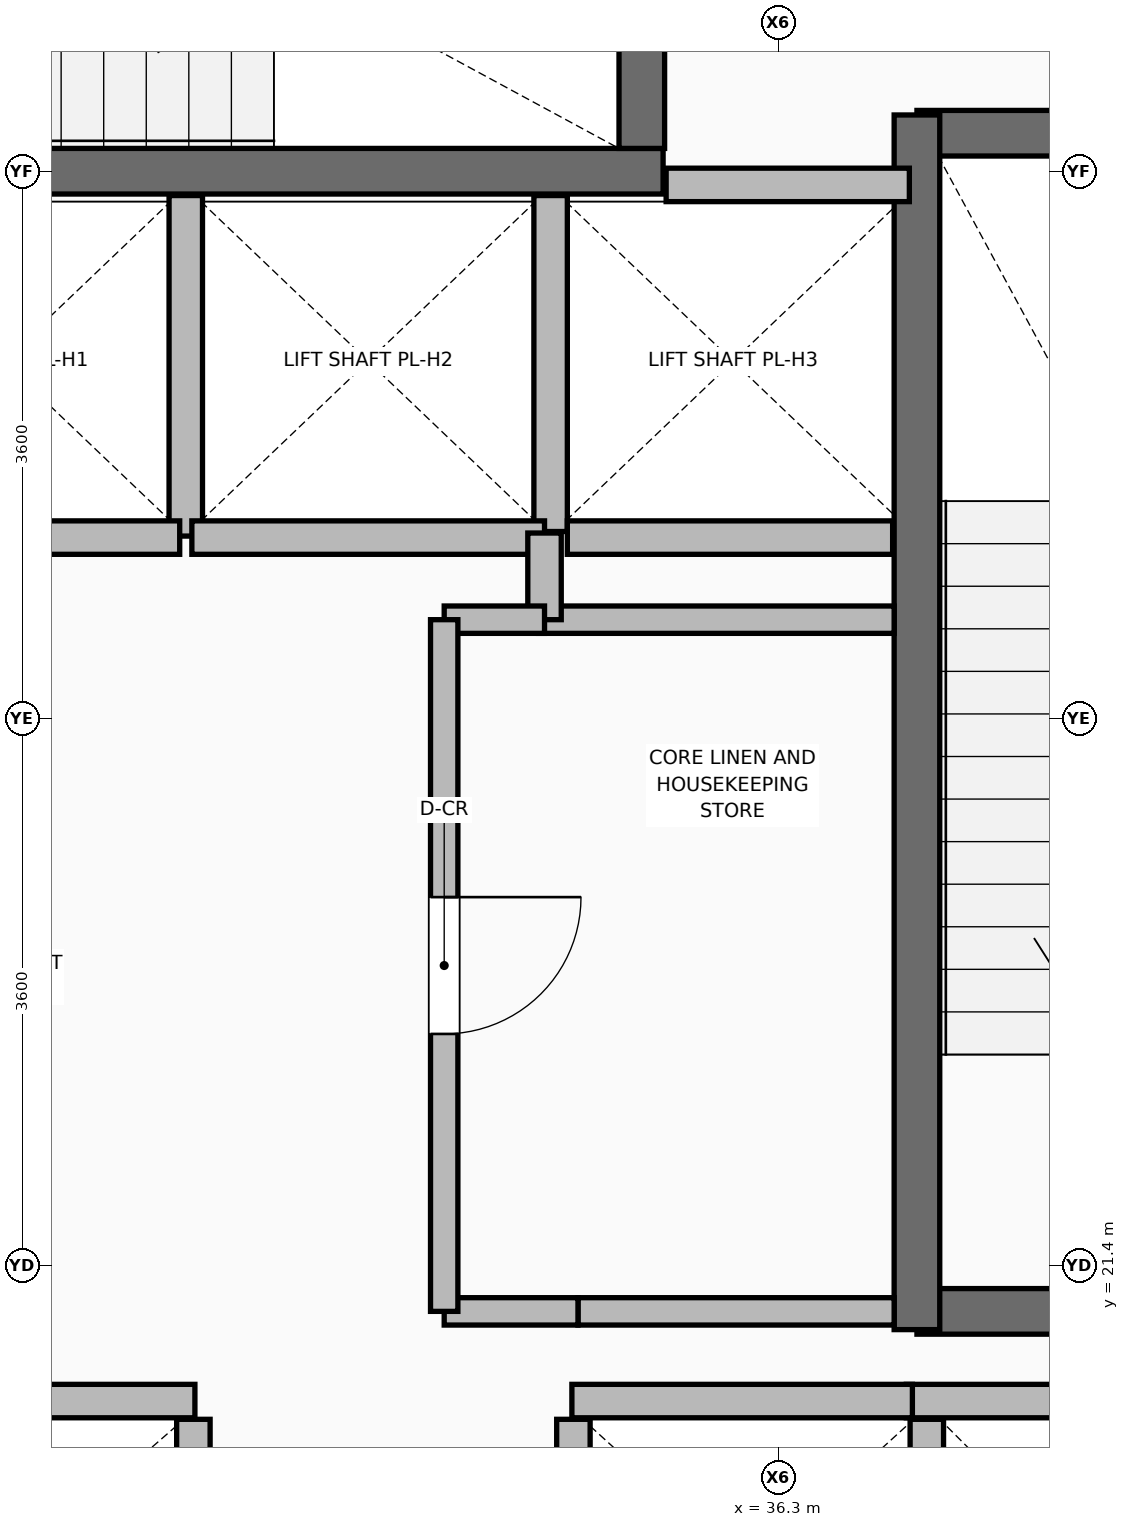
"""IFC4 building model, lengths in metres.
Left out: names, types, materials, properties, quantities, classifications, styles, units other than length and angle.
Written with IfcOpenShell. Run it as: python <this file> out.ifc"""

import sys

from ifc_helpers import new_model, si_unit, direction, frame, frame_2d, origin, place, context, subcontext, project, spatial, rectangle, extrude, element, fill, save


model = new_model("IFC4")
c1 = context("Model", 3, precision=1e-05, world=origin(), true_north=direction((0.0, 1.0)))
c2 = subcontext(c1, "Body", "Model", "MODEL_VIEW")
j1 = project(units=[si_unit("LENGTHUNIT", "METRE"), si_unit("PLANEANGLEUNIT", "RADIAN")], contexts=[c1])
p1 = place(None, origin())
s1 = spatial("IfcSite", under=j1, at=p1, CompositionType="ELEMENT")
p2 = place(p1, origin())
s2 = spatial("IfcBuilding", under=s1, at=p2, CompositionType="ELEMENT")
p3 = place(p2, frame((0.0, 0.0, 11.0)))
s3 = spatial("IfcBuildingStorey", under=s2, at=p3, CompositionType="ELEMENT", Elevation=11.0)
for number, where, z_axis, x_axis in (
    (1, (32.45, 17.92, 0.0), (0.0, 0.0, 1.0), (0.0, 1.0, 0.0)),
    (2, (34.95, 17.92, 0.0), (0.0, 0.0, 1.0), (0.0, 1.0, 0.0)),
):
    element("IfcWall", number, at=place(p3, frame(where, z_axis=z_axis, x_axis=x_axis)), inside=s3, PredefinedType="PARTITIONING", context=c2, shape_type="SweptSolid", body=[
        extrude(rectangle(XDim=2.47, YDim=0.22, at=frame_2d((1.235, 0.0))), origin(), (0.0, 0.0, 1.0), 4.178),
    ])
p4 = place(p3, frame((37.275, 18.08, 0.0), z_axis=(0.0, 0.0, 1.0), x_axis=(0.0, 1.0, 0.0)))
e3 = element("IfcWall", 3, at=p4, inside=s3, PredefinedType="PARTITIONING", context=c2, shape_type="SweptSolid", body=[
    extrude(rectangle(XDim=2.31, YDim=0.22, at=frame_2d((1.155, 0.0))), origin(), (0.0, 0.0, 1.0), 4.795),
])
p5 = place(p3, frame((32.4, 26.2, 0.0), z_axis=(0.0, 0.0, 1.0), x_axis=(0.0, 1.0, 0.0)))
e4 = element("IfcWall", 4, at=p5, inside=s3, PredefinedType="PARTITIONING", context=c2, shape_type="SweptSolid", body=[
    extrude(rectangle(XDim=2.24, YDim=0.22, at=frame_2d((1.12, 0.0))), origin(), (0.0, 0.0, 1.0), 4.795),
])
p6 = place(p3, frame((34.8, 26.23, 0.0), z_axis=(0.0, 0.0, 1.0), x_axis=(0.0, 1.0, 0.0)))
e5 = element("IfcWall", 5, at=p6, inside=s3, PredefinedType="PARTITIONING", context=c2, shape_type="SweptSolid", body=[
    extrude(rectangle(XDim=2.21, YDim=0.22, at=frame_2d((1.105, 0.0))), origin(), (0.0, 0.0, 1.0), 4.795),
])
p7 = place(p3, frame((34.91, 26.19, 0.0), z_axis=(0.0, 0.0, 1.0), x_axis=(1.0, 0.0, 0.0)))
e6 = element("IfcWall", 6, at=p7, inside=s3, PredefinedType="PARTITIONING", context=c2, shape_type="SweptSolid", body=[
    extrude(rectangle(XDim=2.14, YDim=0.22, at=frame_2d((1.07, 0.0))), origin(), (0.0, 0.0, 1.0), 4.795),
])
for number, where, z_axis, x_axis in (
    (7, (37.21, 21.1, 0.0), (0.0, 0.0, 1.0), (1.0, 0.0, 0.0)),
    (8, (37.21, 28.85, 0.0), (0.0, 0.0, 1.0), (1.0, 0.0, 0.0)),
):
    element("IfcWall", number, at=place(p3, frame(where, z_axis=z_axis, x_axis=x_axis)), inside=s3, PredefinedType="SHEAR", context=c2, shape_type="SweptSolid", body=[
        extrude(rectangle(XDim=3.565, YDim=0.3, at=frame_2d((1.782, 0.0))), origin(), (0.0, 0.0, 1.0), 4.82),
    ])
p8 = place(p3, frame((37.21, 20.98, 0.0), z_axis=(0.0, 0.0, 1.0), x_axis=(0.0, 1.0, 0.0)))
e9 = element("IfcWall", 9, at=p8, inside=s3, PredefinedType="SHEAR", context=c2, shape_type="SweptSolid", body=[
    extrude(rectangle(XDim=7.99, YDim=0.3, at=frame_2d((3.995, 0.0))), origin(), (0.0, 0.0, 1.0), 4.82),
])
p9 = place(p3, frame((27.51, 28.6, 0.0), z_axis=(0.0, 0.0, 1.0), x_axis=(1.0, 0.0, 0.0)))
e10 = element("IfcWall", 10, at=p9, inside=s3, PredefinedType="SHEAR", context=c2, shape_type="SweptSolid", body=[
    extrude(rectangle(XDim=8.03, YDim=0.3, at=frame_2d((4.015, 0.0))), origin(), (0.0, 0.0, 1.0), 4.82),
])
p10 = place(p3, frame((35.4, 28.75, 0.0), z_axis=(0.0, 0.0, 1.0), x_axis=(0.0, 1.0, 0.0)))
e11 = element("IfcWall", 11, at=p10, inside=s3, PredefinedType="SHEAR", context=c2, shape_type="SweptSolid", body=[
    extrude(rectangle(XDim=3.375, YDim=0.3, at=frame_2d((1.688, 0.0))), origin(), (0.0, 0.0, 1.0), 4.82),
])
p11 = place(p3, frame((30.04, 20.51, 0.0), z_axis=(0.0, 0.0, 1.0), x_axis=(1.0, 0.0, 0.0)))
e12 = element("IfcWall", 12, at=p11, inside=s3, PredefinedType="PARTITIONING", context=c2, shape_type="SweptSolid", body=[
    extrude(rectangle(XDim=2.42, YDim=0.22, at=frame_2d((1.21, 0.0))), origin(), (0.0, 0.0, 1.0), 4.8),
])
for number, where, z_axis, x_axis in (
    (13, (37.14, 20.51, 0.0), (0.0, 0.0, 1.0), (1.0, 0.0, 0.0)),
    (14, (34.94, 20.51, 0.0), (0.0, 0.0, 1.0), (1.0, 0.0, 0.0)),
):
    element("IfcWall", number, at=place(p3, frame(where, z_axis=z_axis, x_axis=x_axis)), inside=s3, PredefinedType="PARTITIONING", context=c2, shape_type="SweptSolid", body=[
        extrude(rectangle(XDim=2.24, YDim=0.22, at=frame_2d((1.12, 0.0))), origin(), (0.0, 0.0, 1.0), 4.8),
    ])
for number, where, z_axis, x_axis in (
    (15, (30.04, 26.19, 0.0), (0.0, 0.0, 1.0), (1.0, 0.0, 0.0)),
    (16, (32.44, 26.19, 0.0), (0.0, 0.0, 1.0), (1.0, 0.0, 0.0)),
):
    element("IfcWall", number, at=place(p3, frame(where, z_axis=z_axis, x_axis=x_axis)), inside=s3, PredefinedType="PARTITIONING", context=c2, shape_type="SweptSolid", body=[
        extrude(rectangle(XDim=2.32, YDim=0.22, at=frame_2d((1.16, 0.0))), origin(), (0.0, 0.0, 1.0), 4.8),
    ])
p12 = place(p3, frame((35.56, 28.51, 0.0), z_axis=(0.0, 0.0, 1.0), x_axis=(1.0, 0.0, 0.0)))
e17 = element("IfcWall", 17, at=p12, inside=s3, PredefinedType="PARTITIONING", context=c2, shape_type="SweptSolid", body=[
    extrude(rectangle(XDim=1.6, YDim=0.22, at=frame_2d((0.8, 0.0))), origin(), (0.0, 0.0, 1.0), 4.8),
])
p13 = place(p3, frame((34.98, 21.1, 0.0), z_axis=(0.0, 0.0, 1.0), x_axis=(1.0, 0.0, 0.0)))
e18 = element("IfcWall", 18, at=p13, inside=s3, PredefinedType="PARTITIONING", context=c2, shape_type="SweptSolid", body=[
    extrude(rectangle(XDim=2.08, YDim=0.18, at=frame_2d((1.04, 0.0))), origin(), (0.0, 0.0, 1.0), 4.8),
])
p14 = place(p3, frame((34.72, 25.65, 0.0), z_axis=(0.0, 0.0, 1.0), x_axis=(1.0, 0.0, 0.0)))
e19 = element("IfcWall", 19, at=p14, inside=s3, PredefinedType="PARTITIONING", context=c2, shape_type="SweptSolid", body=[
    extrude(rectangle(XDim=2.34, YDim=0.18, at=frame_2d((1.17, 0.0))), origin(), (0.0, 0.0, 1.0), 4.8),
])
p15 = place(p3, frame((34.76, 25.65, 0.0), z_axis=(0.0, 0.0, 1.0), x_axis=(0.0, 1.0, 0.0)))
e20 = element("IfcWall", 20, at=p15, inside=s3, PredefinedType="PARTITIONING", context=c2, shape_type="SweptSolid", body=[
    extrude(rectangle(XDim=0.57, YDim=0.22, at=frame_2d((0.285, 0.0))), origin(), (0.0, 0.0, 1.0), 4.8),
])
p16 = place(p3, frame((34.1, 21.1, 0.0), z_axis=(0.0, 0.0, 1.0), x_axis=(1.0, 0.0, 0.0)))
e21 = element("IfcWall", 21, at=p16, inside=s3, PredefinedType="PARTITIONING", context=c2, shape_type="SweptSolid", body=[
    extrude(rectangle(XDim=0.88, YDim=0.18, at=frame_2d((0.44, 0.0))), origin(), (0.0, 0.0, 1.0), 4.8),
])
p17 = place(p3, frame((34.1, 25.65, 0.0), z_axis=(0.0, 0.0, 1.0), x_axis=(1.0, 0.0, 0.0)))
e22 = element("IfcWall", 22, at=p17, inside=s3, PredefinedType="PARTITIONING", context=c2, shape_type="SweptSolid", body=[
    extrude(rectangle(XDim=0.66, YDim=0.18, at=frame_2d((0.33, 0.0))), origin(), (0.0, 0.0, 1.0), 4.8),
])
p18 = place(p3, frame((34.1, 21.1, 0.0), z_axis=(0.0, 0.0, 1.0), x_axis=(0.0, 1.0, 0.0)))
e23 = element("IfcWall", 23, at=p18, inside=s3, PredefinedType="PARTITIONING", context=c2, shape_type="SweptSolid", body=[
    extrude(rectangle(XDim=4.55, YDim=0.18, at=frame_2d((2.275, 0.0))), origin(), (0.0, 0.0, 1.0), 4.8),
])
p19 = place(p18, frame((1.825, 0.0, 0.0)))
e24 = element("IfcOpeningElement", 24, at=p19, cuts=e23, PredefinedType="OPENING", context=c2, shape_type="SweptSolid", body=[
    extrude(rectangle(XDim=0.9, YDim=2.1, at=frame_2d((0.45, 1.05))), frame((0.0, 0.1, 0.0), z_axis=(0.0, -1.0, 0.0), x_axis=(1.0, 0.0, 0.0)), (0.0, 0.0, 1.0), 0.2),
])
p20 = place(p19, frame((0.9, 0.0, 0.0), z_axis=(0.0, 0.0, 1.0), x_axis=(-1.0, 0.0, 0.0)))
e25 = element("IfcDoor", 25, at=p20, inside=s3, OperationType="SINGLE_SWING_LEFT", PredefinedType="DOOR", context=c2, shape_type="SweptSolid", body=[
    extrude(rectangle(XDim=0.9, YDim=2.1, at=frame_2d((0.45, 1.05))), frame((0.0, 0.025, 0.0), z_axis=(0.0, -1.0, 0.0), x_axis=(1.0, 0.0, 0.0)), (0.0, 0.0, 1.0), 0.05),
])
fill(e24, e25)
save(model, sys.argv[1])
